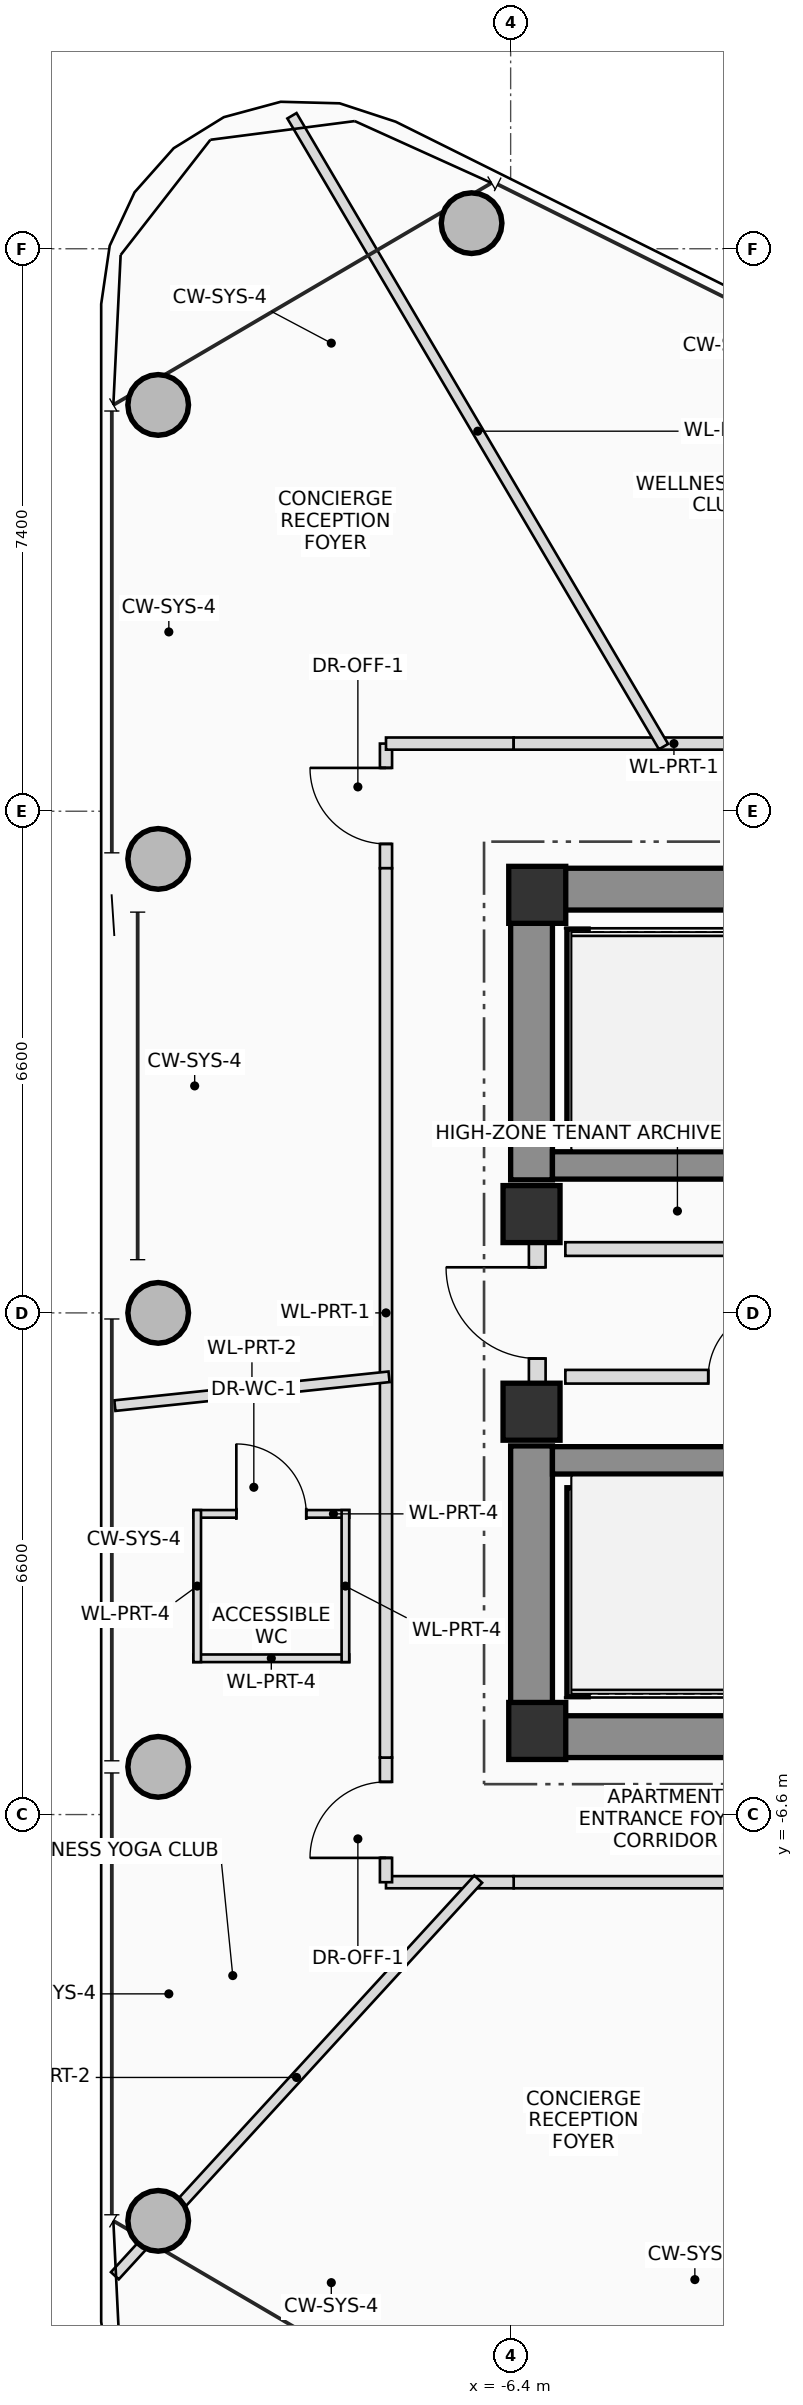
"""IFC4 building model, lengths in metres.
Left out: names, types, materials, properties, quantities, classifications, styles, units other than length and angle.
Written with IfcOpenShell. Run it as: python <this file> out.ifc"""

import sys

from ifc_helpers import new_model, si_unit, direction, frame, frame_2d, origin, origin_2d, place, context, subcontext, project, spatial, rectangle, hollow_circle, extrude, source, transform, mapped, element, fill, save


model = new_model("IFC4")
c1 = context("Model", 3, precision=1e-05, world=origin(), true_north=direction((0.0, 1.0)))
c2 = subcontext(c1, "Body", "Model", "MODEL_VIEW")
j1 = project(units=[si_unit("LENGTHUNIT", "METRE"), si_unit("PLANEANGLEUNIT", "RADIAN")], contexts=[c1])
p1 = place(None, origin())
s1 = spatial("IfcSite", under=j1, at=p1, CompositionType="ELEMENT")
p2 = place(p1, origin())
s2 = spatial("IfcBuilding", under=s1, at=p2, CompositionType="ELEMENT")
p3 = place(p2, frame((0.0, 0.0, 310.55)))
s3 = spatial("IfcBuildingStorey", under=s2, at=p3, CompositionType="ELEMENT", Elevation=310.55)
m1 = source(origin(), c2, "Body", "SweptSolid", [
    extrude(rectangle(XDim=0.75, YDim=0.75, at=origin_2d()), origin(), (0.0, 0.0, 1.0), 3.45),
])
for number, where, z_axis, x_axis in (
    (1, (-6.05, -5.5, 0.0), (0.0, 0.0, 1.0), (1.0, 0.0, 0.0)),
    (2, (-6.05, 5.5, 0.0), (0.0, 0.0, 1.0), (1.0, 0.0, 0.0)),
):
    element("IfcColumn", number, at=place(p3, frame(where, z_axis=z_axis, x_axis=x_axis)), inside=s3, PredefinedType="COLUMN", context=c2, shape_type="MappedRepresentation", body=[
        mapped(m1, transform((0.0, 0.0, 0.0), scale=1.0)),
    ])
p4 = place(p3, frame((-6.4, 5.575, 0.0), z_axis=(0.0, 0.0, 1.0), x_axis=(1.0, 0.0, 0.0)))
e3 = element("IfcWall", 3, at=p4, inside=s3, PredefinedType="SHEAR", context=c2, shape_type="SweptSolid", body=[
    extrude(rectangle(XDim=12.8, YDim=0.55, at=frame_2d((6.4, 0.0))), origin(), (0.0, 0.0, 1.0), 3.45),
])
p5 = place(p4, frame((8.6, 0.0, 0.0)))
e4 = element("IfcOpeningElement", 4, at=p5, cuts=e3, PredefinedType="OPENING", context=c2, shape_type="SweptSolid", body=[
    extrude(rectangle(XDim=1.2, YDim=2.2, at=frame_2d((0.6, 1.1))), frame((0.0, 0.285, 0.0), z_axis=(0.0, -1.0, 0.0), x_axis=(1.0, 0.0, 0.0)), (0.0, 0.0, 1.0), 0.57),
])
p6 = place(p3, frame((-6.4, -5.575, 0.0), z_axis=(0.0, 0.0, 1.0), x_axis=(1.0, 0.0, 0.0)))
e5 = element("IfcWall", 5, at=p6, inside=s3, PredefinedType="SHEAR", context=c2, shape_type="SweptSolid", body=[
    extrude(rectangle(XDim=12.8, YDim=0.55, at=frame_2d((6.4, 0.0))), origin(), (0.0, 0.0, 1.0), 3.45),
])
p7 = place(p6, frame((8.6, 0.0, 0.0)))
e6 = element("IfcOpeningElement", 6, at=p7, cuts=e5, PredefinedType="OPENING", context=c2, shape_type="SweptSolid", body=[
    extrude(rectangle(XDim=1.2, YDim=2.2, at=frame_2d((0.6, 1.1))), frame((0.0, 0.285, 0.0), z_axis=(0.0, -1.0, 0.0), x_axis=(1.0, 0.0, 0.0)), (0.0, 0.0, 1.0), 0.57),
])
for number, where, z_axis, x_axis in (
    (7, (-6.125, -5.3, 0.0), (0.0, 0.0, 1.0), (0.0, 1.0, 0.0)),
    (8, (-6.125, 1.75, 0.0), (0.0, 0.0, 1.0), (0.0, 1.0, 0.0)),
):
    element("IfcWall", number, at=place(p3, frame(where, z_axis=z_axis, x_axis=x_axis)), inside=s3, PredefinedType="SHEAR", context=c2, shape_type="SweptSolid", body=[
        extrude(rectangle(XDim=3.55, YDim=0.55, at=frame_2d((1.775, 0.0))), origin(), (0.0, 0.0, 1.0), 3.45),
    ])
for number, where, z_axis, x_axis in (
    (9, (-5.85, 1.94, 0.0), (0.0, 0.0, 1.0), (1.0, 0.0, 0.0)),
    (10, (-5.85, -1.94, 0.0), (0.0, 0.0, 1.0), (1.0, 0.0, 0.0)),
):
    element("IfcWall", number, at=place(p3, frame(where, z_axis=z_axis, x_axis=x_axis)), inside=s3, PredefinedType="SHEAR", context=c2, shape_type="SweptSolid", body=[
        extrude(rectangle(XDim=11.7, YDim=0.36, at=frame_2d((5.85, 0.0))), origin(), (0.0, 0.0, 1.0), 3.45),
    ])
for number, where, z_axis, x_axis in (
    (11, (-5.52, 2.3, 0.0), (0.0, 0.0, 1.0), (0.0, 1.0, 0.0)),
    (12, (-5.52, -5.05, 0.0), (0.0, 0.0, 1.0), (0.0, 1.0, 0.0)),
):
    element("IfcWall", number, at=place(p3, frame(where, z_axis=z_axis, x_axis=x_axis)), inside=s3, PredefinedType="SHEAR", context=c2, shape_type="SweptSolid", body=[
        extrude(rectangle(XDim=2.75, YDim=0.28, at=frame_2d((1.375, 0.0))), origin(), (0.0, 0.0, 1.0), 3.45),
    ])
for number, where, z_axis, x_axis in (
    (13, (-6.125, -1.3, 0.0), (0.0, 0.0, 1.0), (1.0, 0.0, 0.0)),
    (14, (-6.125, 1.3, 0.0), (0.0, 0.0, 1.0), (1.0, 0.0, 0.0)),
):
    element("IfcColumn", number, at=place(p3, frame(where, z_axis=z_axis, x_axis=x_axis)), inside=s3, PredefinedType="COLUMN", context=c2, shape_type="MappedRepresentation", body=[
        mapped(m1, transform((0.0, 0.0, 0.0), scale=1.0)),
    ])
m2 = source(origin(), c2, "Body", "SweptSolid", [
    extrude(hollow_circle(Radius=0.4, WallThickness=0.028, at=origin_2d()), origin(), (0.0, 0.0, 1.0), 3.45),
])
for number, where, z_axis, x_axis in (
    (15, (-6.914, 14.337, 0.0), (0.0, 0.0, 1.0), (1.0, 0.0, 0.0)),
    (16, (-11.037, 11.945, 0.0), (0.0, 0.0, 1.0), (1.0, 0.0, 0.0)),
    (17, (-11.037, 5.973, 0.0), (0.0, 0.0, 1.0), (1.0, 0.0, 0.0)),
    (18, (-11.037, 0.0, 0.0), (0.0, 0.0, 1.0), (1.0, 0.0, 0.0)),
    (19, (-11.037, -5.973, 0.0), (0.0, 0.0, 1.0), (1.0, 0.0, 0.0)),
    (20, (-11.037, -11.945, 0.0), (0.0, 0.0, 1.0), (1.0, 0.0, 0.0)),
):
    element("IfcColumn", number, at=place(p3, frame(where, z_axis=z_axis, x_axis=x_axis)), inside=s3, PredefinedType="COLUMN", context=c2, shape_type="MappedRepresentation", body=[
        mapped(m2, transform((0.0, 0.0, 0.0), scale=1.0)),
    ])
p8 = place(p3, frame((-6.05, -0.95, 0.0), z_axis=(0.0, 0.0, 1.0), x_axis=(0.0, 1.0, 0.0)))
e21 = element("IfcWall", 21, at=p8, inside=s3, PredefinedType="PLUMBINGWALL", context=c2, shape_type="SweptSolid", body=[
    extrude(rectangle(XDim=1.9, YDim=0.22, at=frame_2d((0.95, 0.0))), origin(), (0.0, 0.0, 1.0), 2.23),
])
p9 = place(p8, frame((0.35, 0.0, 0.0)))
e22 = element("IfcOpeningElement", 22, at=p9, cuts=e21, PredefinedType="OPENING", context=c2, shape_type="SweptSolid", body=[
    extrude(rectangle(XDim=1.2, YDim=2.2, at=frame_2d((0.6, 1.1))), frame((0.0, 0.12, 0.0), z_axis=(0.0, -1.0, 0.0), x_axis=(1.0, 0.0, 0.0)), (0.0, 0.0, 1.0), 0.24),
])
p10 = place(p3, frame((-5.68, 0.84, 0.0), z_axis=(0.0, 0.0, 1.0), x_axis=(1.0, 0.0, 0.0)))
e23 = element("IfcWall", 23, at=p10, inside=s3, PredefinedType="PLUMBINGWALL", context=c2, shape_type="SweptSolid", body=[
    extrude(rectangle(XDim=11.33, YDim=0.18, at=frame_2d((5.665, 0.0))), origin(), (0.0, 0.0, 1.0), 3.25),
])
p11 = place(p10, frame((3.13, 0.0, 0.0)))
e24 = element("IfcOpeningElement", 24, at=p11, cuts=e23, PredefinedType="OPENING", context=c2, shape_type="SweptSolid", body=[
    extrude(rectangle(XDim=0.9, YDim=2.05, at=frame_2d((0.45, 1.025))), frame((0.0, 0.1, 0.0), z_axis=(0.0, -1.0, 0.0), x_axis=(1.0, 0.0, 0.0)), (0.0, 0.0, 1.0), 0.2),
])
p12 = place(p10, frame((7.33, 0.0, 0.0)))
e25 = element("IfcOpeningElement", 25, at=p12, cuts=e23, PredefinedType="OPENING", context=c2, shape_type="SweptSolid", body=[
    extrude(rectangle(XDim=1.1, YDim=2.2, at=frame_2d((0.55, 1.1))), frame((0.0, 0.1, 0.0), z_axis=(0.0, -1.0, 0.0), x_axis=(1.0, 0.0, 0.0)), (0.0, 0.0, 1.0), 0.2),
])
p13 = place(p10, frame((8.83, 0.0, 0.0)))
e26 = element("IfcOpeningElement", 26, at=p13, cuts=e23, PredefinedType="OPENING", context=c2, shape_type="SweptSolid", body=[
    extrude(rectangle(XDim=1.1, YDim=2.2, at=frame_2d((0.55, 1.1))), frame((0.0, 0.1, 0.0), z_axis=(0.0, -1.0, 0.0), x_axis=(1.0, 0.0, 0.0)), (0.0, 0.0, 1.0), 0.2),
])
p14 = place(p3, frame((-5.68, -0.84, 0.0), z_axis=(0.0, 0.0, 1.0), x_axis=(1.0, 0.0, 0.0)))
e27 = element("IfcWall", 27, at=p14, inside=s3, PredefinedType="PLUMBINGWALL", context=c2, shape_type="SweptSolid", body=[
    extrude(rectangle(XDim=10.22, YDim=0.18, at=frame_2d((5.11, 0.0))), origin(), (0.0, 0.0, 1.0), 3.25),
])
p15 = place(p14, frame((1.88, 0.0, 0.0)))
e28 = element("IfcOpeningElement", 28, at=p15, cuts=e27, PredefinedType="OPENING", context=c2, shape_type="SweptSolid", body=[
    extrude(rectangle(XDim=0.9, YDim=2.05, at=frame_2d((0.45, 1.025))), frame((0.0, 0.1, 0.0), z_axis=(0.0, -1.0, 0.0), x_axis=(1.0, 0.0, 0.0)), (0.0, 0.0, 1.0), 0.2),
])
p16 = place(p14, frame((5.35, 0.0, 0.0)))
e29 = element("IfcOpeningElement", 29, at=p16, cuts=e27, PredefinedType="OPENING", context=c2, shape_type="SweptSolid", body=[
    extrude(rectangle(XDim=0.9, YDim=2.05, at=frame_2d((0.45, 1.025))), frame((0.0, 0.1, 0.0), z_axis=(0.0, -1.0, 0.0), x_axis=(1.0, 0.0, 0.0)), (0.0, 0.0, 1.0), 0.2),
])
p17 = place(p14, frame((7.33, 0.0, 0.0)))
e30 = element("IfcOpeningElement", 30, at=p17, cuts=e27, PredefinedType="OPENING", context=c2, shape_type="SweptSolid", body=[
    extrude(rectangle(XDim=1.1, YDim=2.2, at=frame_2d((0.55, 1.1))), frame((0.0, 0.1, 0.0), z_axis=(0.0, -1.0, 0.0), x_axis=(1.0, 0.0, 0.0)), (0.0, 0.0, 1.0), 0.2),
])
p18 = place(p14, frame((9.02, 0.0, 0.0)))
e31 = element("IfcOpeningElement", 31, at=p18, cuts=e27, PredefinedType="OPENING", context=c2, shape_type="SweptSolid", body=[
    extrude(rectangle(XDim=0.9, YDim=2.05, at=frame_2d((0.45, 1.025))), frame((0.0, 0.1, 0.0), z_axis=(0.0, -1.0, 0.0), x_axis=(1.0, 0.0, 0.0)), (0.0, 0.0, 1.0), 0.2),
])
p19 = place(p3, frame((-10.574, -2.644, 0.0), z_axis=(0.0, 0.0, 1.0), x_axis=(1.0, 0.0, 0.0)))
e32 = element("IfcWall", 32, at=p19, inside=s3, PredefinedType="PARTITIONING", context=c2, shape_type="SweptSolid", body=[
    extrude(rectangle(XDim=2.05, YDim=0.1, at=frame_2d((1.025, 0.0))), origin(), (0.0, 0.0, 1.0), 2.655),
])
p20 = place(p19, frame((0.565, 0.0, 0.0)))
e33 = element("IfcOpeningElement", 33, at=p20, cuts=e32, PredefinedType="OPENING", context=c2, shape_type="SweptSolid", body=[
    extrude(rectangle(XDim=0.92, YDim=2.1, at=frame_2d((0.46, 1.05))), frame((0.0, 0.06, 0.0), z_axis=(0.0, -1.0, 0.0), x_axis=(1.0, 0.0, 0.0)), (0.0, 0.0, 1.0), 0.12),
])
p21 = place(p3, frame((-8.524, -4.544, 0.0), z_axis=(0.0, 0.0, 1.0), x_axis=(-1.0, 0.0, 0.0)))
e34 = element("IfcWall", 34, at=p21, inside=s3, PredefinedType="PARTITIONING", context=c2, shape_type="SweptSolid", body=[
    extrude(rectangle(XDim=2.05, YDim=0.1, at=frame_2d((1.025, 0.0))), origin(), (0.0, 0.0, 1.0), 2.855),
])
p22 = place(p3, frame((-8.574, -2.594, 0.0), z_axis=(0.0, 0.0, 1.0), x_axis=(0.0, -1.0, 0.0)))
e35 = element("IfcWall", 35, at=p22, inside=s3, PredefinedType="PARTITIONING", context=c2, shape_type="SweptSolid", body=[
    extrude(rectangle(XDim=2.0, YDim=0.1, at=frame_2d((1.0, 0.0))), origin(), (0.0, 0.0, 1.0), 2.655),
])
p23 = place(p3, frame((-10.524, -4.594, 0.0), z_axis=(0.0, 0.0, 1.0), x_axis=(0.0, 1.0, 0.0)))
e36 = element("IfcWall", 36, at=p23, inside=s3, PredefinedType="PARTITIONING", context=c2, shape_type="SweptSolid", body=[
    extrude(rectangle(XDim=2.0, YDim=0.1, at=frame_2d((1.0, 0.0))), origin(), (0.0, 0.0, 1.0), 3.25),
])
p24 = place(p3, frame((-8.04, 5.85, 0.0), z_axis=(0.0, 0.0, 1.0), x_axis=(0.0, 1.0, 0.0)))
e37 = element("IfcWall", 37, at=p24, inside=s3, PredefinedType="PARTITIONING", context=c2, shape_type="SweptSolid", body=[
    extrude(rectangle(XDim=1.64, YDim=0.16, at=frame_2d((0.82, 0.0))), origin(), (0.0, 0.0, 1.0), 2.905),
])
p25 = place(p24, frame((0.32, 0.0, 0.0)))
e38 = element("IfcOpeningElement", 38, at=p25, cuts=e37, PredefinedType="OPENING", context=c2, shape_type="SweptSolid", body=[
    extrude(rectangle(XDim=1.0, YDim=2.25, at=frame_2d((0.5, 1.125))), frame((0.0, 0.09, 0.0), z_axis=(0.0, -1.0, 0.0), x_axis=(1.0, 0.0, 0.0)), (0.0, 0.0, 1.0), 0.18),
])
p26 = place(p3, frame((-8.04, 7.49, 0.0), z_axis=(0.0, 0.0, 1.0), x_axis=(1.0, 0.0, 0.0)))
e39 = element("IfcWall", 39, at=p26, inside=s3, PredefinedType="PARTITIONING", context=c2, shape_type="SweptSolid", body=[
    extrude(rectangle(XDim=1.68, YDim=0.16, at=frame_2d((0.84, 0.0))), origin(), (0.0, 0.0, 1.0), 2.655),
])
p27 = place(p3, frame((-6.36, 7.49, 0.0), z_axis=(0.0, 0.0, 1.0), x_axis=(1.0, 0.0, 0.0)))
e40 = element("IfcWall", 40, at=p27, inside=s3, PredefinedType="PARTITIONING", context=c2, shape_type="SweptSolid", body=[
    extrude(rectangle(XDim=9.679, YDim=0.16, at=frame_2d((4.84, 0.0))), origin(), (0.0, 0.0, 1.0), 2.655),
])
p28 = place(p27, frame((4.367, 0.0, 0.0)))
e41 = element("IfcOpeningElement", 41, at=p28, cuts=e40, PredefinedType="OPENING", context=c2, shape_type="SweptSolid", body=[
    extrude(rectangle(XDim=1.0, YDim=2.25, at=frame_2d((0.5, 1.125))), frame((0.0, 0.09, 0.0), z_axis=(0.0, -1.0, 0.0), x_axis=(1.0, 0.0, 0.0)), (0.0, 0.0, 1.0), 0.18),
])
p29 = place(p27, frame((8.406, 0.0, 0.0)))
e42 = element("IfcOpeningElement", 42, at=p29, cuts=e40, PredefinedType="OPENING", context=c2, shape_type="SweptSolid", body=[
    extrude(rectangle(XDim=1.0, YDim=2.25, at=frame_2d((0.5, 1.125))), frame((0.0, 0.09, 0.0), z_axis=(0.0, -1.0, 0.0), x_axis=(1.0, 0.0, 0.0)), (0.0, 0.0, 1.0), 0.18),
])
p30 = place(p3, frame((3.319, -7.49, 0.0), z_axis=(0.0, 0.0, 1.0), x_axis=(-1.0, 0.0, 0.0)))
e43 = element("IfcWall", 43, at=p30, inside=s3, PredefinedType="PARTITIONING", context=c2, shape_type="SweptSolid", body=[
    extrude(rectangle(XDim=9.679, YDim=0.16, at=frame_2d((4.84, 0.0))), origin(), (0.0, 0.0, 1.0), 2.655),
])
p31 = place(p30, frame((4.53, 0.0, 0.0)))
e44 = element("IfcOpeningElement", 44, at=p31, cuts=e43, PredefinedType="OPENING", context=c2, shape_type="SweptSolid", body=[
    extrude(rectangle(XDim=1.0, YDim=2.25, at=frame_2d((0.5, 1.125))), frame((0.0, 0.09, 0.0), z_axis=(0.0, -1.0, 0.0), x_axis=(1.0, 0.0, 0.0)), (0.0, 0.0, 1.0), 0.18),
])
p32 = place(p3, frame((-6.36, -7.49, 0.0), z_axis=(0.0, 0.0, 1.0), x_axis=(-1.0, 0.0, 0.0)))
e45 = element("IfcWall", 45, at=p32, inside=s3, PredefinedType="PARTITIONING", context=c2, shape_type="SweptSolid", body=[
    extrude(rectangle(XDim=1.68, YDim=0.16, at=frame_2d((0.84, 0.0))), origin(), (0.0, 0.0, 1.0), 2.655),
])
p33 = place(p3, frame((-8.04, -7.49, 0.0), z_axis=(0.0, 0.0, 1.0), x_axis=(0.0, 1.0, 0.0)))
e46 = element("IfcWall", 46, at=p33, inside=s3, PredefinedType="PARTITIONING", context=c2, shape_type="SweptSolid", body=[
    extrude(rectangle(XDim=1.64, YDim=0.16, at=frame_2d((0.82, 0.0))), origin(), (0.0, 0.0, 1.0), 3.25),
])
p34 = place(p33, frame((0.32, 0.0, 0.0)))
e47 = element("IfcOpeningElement", 47, at=p34, cuts=e46, PredefinedType="OPENING", context=c2, shape_type="SweptSolid", body=[
    extrude(rectangle(XDim=1.0, YDim=2.25, at=frame_2d((0.5, 1.125))), frame((0.0, 0.09, 0.0), z_axis=(0.0, -1.0, 0.0), x_axis=(1.0, 0.0, 0.0)), (0.0, 0.0, 1.0), 0.18),
])
p35 = place(p3, frame((-8.04, -5.85, 0.0), z_axis=(0.0, 0.0, 1.0), x_axis=(0.0, 1.0, 0.0)))
e48 = element("IfcWall", 48, at=p35, inside=s3, PredefinedType="PARTITIONING", context=c2, shape_type="SweptSolid", body=[
    extrude(rectangle(XDim=11.7, YDim=0.16, at=frame_2d((5.85, 0.0))), origin(), (0.0, 0.0, 1.0), 2.655),
])
p36 = place(p3, frame((-4.388, 7.45, 0.0), z_axis=(0.0, 0.0, 1.0), x_axis=(-0.507535081803, 0.861631093183, 0.0)))
e49 = element("IfcWall", 49, at=p36, inside=s3, PredefinedType="PARTITIONING", context=c2, shape_type="SweptSolid", body=[
    extrude(rectangle(XDim=9.633, YDim=0.14, at=frame_2d((4.816, 0.0))), origin(), (0.0, 0.0, 1.0), 2.655),
])
p37 = place(p3, frame((-8.0, -0.841, 0.0), z_axis=(0.0, 0.0, 1.0), x_axis=(-0.994522036567, -0.104527119842, 0.0)))
e50 = element("IfcWall", 50, at=p37, inside=s3, PredefinedType="PARTITIONING", context=c2, shape_type="SweptSolid", body=[
    extrude(rectangle(XDim=3.627, YDim=0.14, at=frame_2d((1.813, 0.0))), origin(), (0.0, 0.0, 1.0), 2.655),
])
p38 = place(p3, frame((-6.827, -7.45, 0.0), z_axis=(0.0, 0.0, 1.0), x_axis=(-0.675607445236, -0.737261541071, 0.0)))
e51 = element("IfcWall", 51, at=p38, inside=s3, PredefinedType="PARTITIONING", context=c2, shape_type="SweptSolid", body=[
    extrude(rectangle(XDim=7.076, YDim=0.14, at=frame_2d((3.538, 0.0))), origin(), (0.0, 0.0, 1.0), 2.655),
])
p39 = place(p9, origin())
e52 = element("IfcDoor", 52, at=p39, inside=s3, OperationType="SINGLE_SWING_RIGHT", PredefinedType="DOOR", context=c2, shape_type="SweptSolid", body=[
    extrude(rectangle(XDim=1.2, YDim=2.2, at=frame_2d((0.6, 1.1))), frame((0.0, 0.025, 0.0), z_axis=(0.0, -1.0, 0.0), x_axis=(1.0, 0.0, 0.0)), (0.0, 0.0, 1.0), 0.05),
])
fill(e22, e52)
p40 = place(p15, origin())
e53 = element("IfcDoor", 53, at=p40, inside=s3, OperationType="SINGLE_SWING_RIGHT", PredefinedType="DOOR", context=c2, shape_type="SweptSolid", body=[
    extrude(rectangle(XDim=0.9, YDim=2.05, at=frame_2d((0.45, 1.025))), frame((0.0, 0.025, 0.0), z_axis=(0.0, -1.0, 0.0), x_axis=(1.0, 0.0, 0.0)), (0.0, 0.0, 1.0), 0.05),
])
fill(e28, e53)
p41 = place(p20, origin())
e54 = element("IfcDoor", 54, at=p41, inside=s3, OperationType="SINGLE_SWING_LEFT", PredefinedType="DOOR", context=c2, shape_type="SweptSolid", body=[
    extrude(rectangle(XDim=0.92, YDim=2.1, at=frame_2d((0.46, 1.05))), frame((0.0, 0.025, 0.0), z_axis=(0.0, -1.0, 0.0), x_axis=(1.0, 0.0, 0.0)), (0.0, 0.0, 1.0), 0.05),
])
fill(e33, e54)
p42 = place(p25, origin())
e55 = element("IfcDoor", 55, at=p42, inside=s3, OperationType="SINGLE_SWING_RIGHT", PredefinedType="DOOR", context=c2, shape_type="SweptSolid", body=[
    extrude(rectangle(XDim=1.0, YDim=2.25, at=frame_2d((0.5, 1.125))), frame((0.0, 0.025, 0.0), z_axis=(0.0, -1.0, 0.0), x_axis=(1.0, 0.0, 0.0)), (0.0, 0.0, 1.0), 0.05),
])
fill(e38, e55)
p43 = place(p34, origin())
e56 = element("IfcDoor", 56, at=p43, inside=s3, OperationType="SINGLE_SWING_LEFT", PredefinedType="DOOR", context=c2, shape_type="SweptSolid", body=[
    extrude(rectangle(XDim=1.0, YDim=2.25, at=frame_2d((0.5, 1.125))), frame((0.0, 0.025, 0.0), z_axis=(0.0, -1.0, 0.0), x_axis=(1.0, 0.0, 0.0)), (0.0, 0.0, 1.0), 0.05),
])
fill(e47, e56)
save(model, sys.argv[1])
